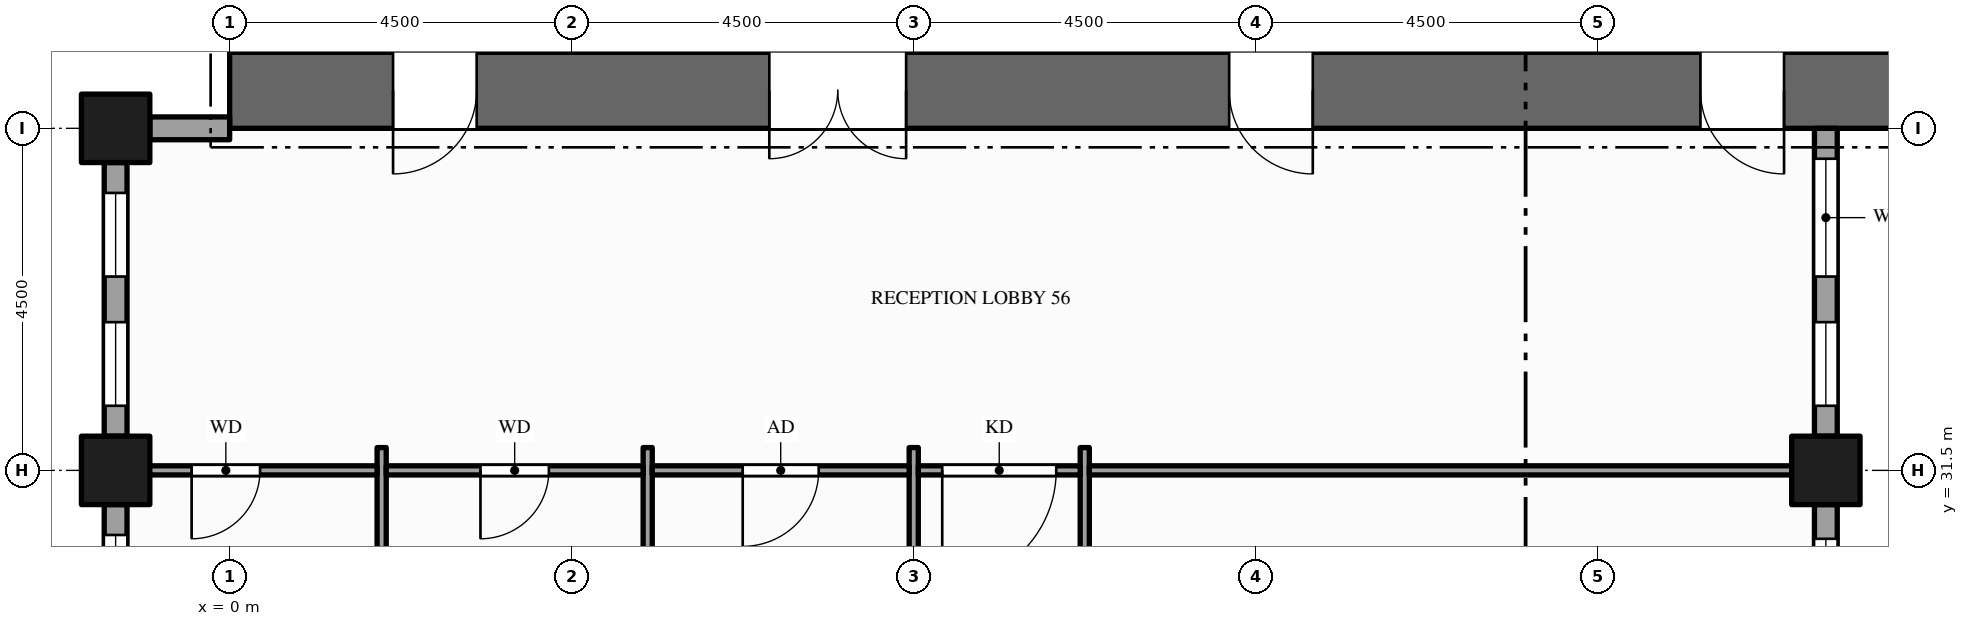
"""IFC4 building model, lengths in metres.
Left out: names, types, materials, properties, quantities, classifications, styles, units other than length and angle.
Written with IfcOpenShell. Run it as: python <this file> out.ifc"""

import sys

from ifc_helpers import new_model, si_unit, direction, frame, frame_2d, origin, origin_2d, place, context, subcontext, project, spatial, rectangle, hollow_rectangle, extrude, element, fill, save


model = new_model("IFC4")
c1 = context("Model", 3, precision=1e-05, world=origin(), true_north=direction((0.0, 1.0)))
c2 = subcontext(c1, "Body", "Model", "MODEL_VIEW")
j1 = project(units=[si_unit("LENGTHUNIT", "METRE"), si_unit("PLANEANGLEUNIT", "RADIAN")], contexts=[c1])
p1 = place(None, origin())
s1 = spatial("IfcSite", under=j1, at=p1, CompositionType="ELEMENT")
p2 = place(p1, origin())
s2 = spatial("IfcBuilding", under=s1, at=p2, CompositionType="ELEMENT")
p3 = place(p2, frame((0.0, 0.0, 155.0)))
s3 = spatial("IfcBuildingStorey", under=s2, at=p3, CompositionType="ELEMENT", Elevation=155.0)
p4 = place(p3, frame((0.0, 36.5, -0.15), z_axis=(0.0, 0.0, 1.0), x_axis=(1.0, 0.0, 0.0)))
e1 = element("IfcWall", 1, at=p4, inside=s3, PredefinedType="SHEAR", context=c2, shape_type="SweptSolid", body=[
    extrude(rectangle(XDim=22.5, YDim=1.0, at=frame_2d((11.25, 0.0))), origin(), (0.0, 0.0, 1.0), 4.0),
])
p5 = place(p4, frame((7.1, 0.0, 0.15)))
e2 = element("IfcOpeningElement", 2, at=p5, cuts=e1, PredefinedType="OPENING", context=c2, shape_type="SweptSolid", body=[
    extrude(rectangle(XDim=1.8, YDim=2.1, at=frame_2d((0.9, 1.05))), frame((0.0, 0.51, 0.0), z_axis=(0.0, -1.0, 0.0), x_axis=(1.0, 0.0, 0.0)), (0.0, 0.0, 1.0), 1.02),
])
p6 = place(p4, frame((13.15, 0.0, 0.15)))
e3 = element("IfcOpeningElement", 3, at=p6, cuts=e1, PredefinedType="OPENING", context=c2, shape_type="SweptSolid", body=[
    extrude(rectangle(XDim=1.1, YDim=2.1, at=frame_2d((0.55, 1.05))), frame((0.0, 0.51, 0.0), z_axis=(0.0, -1.0, 0.0), x_axis=(1.0, 0.0, 0.0)), (0.0, 0.0, 1.0), 1.02),
])
p7 = place(p4, frame((2.15, 0.0, 0.15)))
e4 = element("IfcOpeningElement", 4, at=p7, cuts=e1, PredefinedType="OPENING", context=c2, shape_type="SweptSolid", body=[
    extrude(rectangle(XDim=1.1, YDim=2.1, at=frame_2d((0.55, 1.05))), frame((0.0, 0.51, 0.0), z_axis=(0.0, -1.0, 0.0), x_axis=(1.0, 0.0, 0.0)), (0.0, 0.0, 1.0), 1.02),
])
p8 = place(p4, frame((19.35, 0.0, 0.15)))
e5 = element("IfcOpeningElement", 5, at=p8, cuts=e1, PredefinedType="OPENING", context=c2, shape_type="SweptSolid", body=[
    extrude(rectangle(XDim=1.1, YDim=2.1, at=frame_2d((0.55, 1.05))), frame((0.0, 0.51, 0.0), z_axis=(0.0, -1.0, 0.0), x_axis=(1.0, 0.0, 0.0)), (0.0, 0.0, 1.0), 1.02),
])
for number, where, z_axis, x_axis in (
    (6, (-1.5, 31.5, -0.15), (0.0, 0.0, 1.0), (1.0, 0.0, 0.0)),
    (7, (-1.5, 36.0, -0.15), (0.0, 0.0, 1.0), (1.0, 0.0, 0.0)),
    (8, (21.0, 31.5, -0.15), (0.0, 0.0, 1.0), (1.0, 0.0, 0.0)),
):
    element("IfcColumn", number, at=place(p3, frame(where, z_axis=z_axis, x_axis=x_axis)), inside=s3, PredefinedType="COLUMN", context=c2, shape_type="SweptSolid", body=[
        extrude(hollow_rectangle(XDim=0.9, YDim=0.9, WallThickness=0.045, at=origin_2d()), origin(), (0.0, 0.0, 1.0), 4.0),
    ])
p9 = place(p3, frame((21.0, 28.95, 0.0), z_axis=(0.0, 0.0, 1.0), x_axis=(0.0, 1.0, 0.0)))
e9 = element("IfcWall", 9, at=p9, inside=s3, PredefinedType="STANDARD", context=c2, shape_type="SweptSolid", body=[
    extrude(rectangle(XDim=2.1, YDim=0.3, at=frame_2d((1.05, 0.0))), origin(), (0.0, 0.0, 1.0), 3.149),
])
p10 = place(p9, frame((0.45, 0.0, 0.9)))
e10 = element("IfcOpeningElement", 10, at=p10, cuts=e9, PredefinedType="OPENING", context=c2, shape_type="SweptSolid", body=[
    extrude(rectangle(XDim=1.2, YDim=2.0, at=frame_2d((0.6, 1.0))), frame((0.0, 0.16, 0.0), z_axis=(0.0, -1.0, 0.0), x_axis=(1.0, 0.0, 0.0)), (0.0, 0.0, 1.0), 0.32),
])
p11 = place(p3, frame((21.0, 31.95, 0.0), z_axis=(0.0, 0.0, 1.0), x_axis=(0.0, 1.0, 0.0)))
e11 = element("IfcWall", 11, at=p11, inside=s3, PredefinedType="STANDARD", context=c2, shape_type="SweptSolid", body=[
    extrude(rectangle(XDim=4.05, YDim=0.3, at=frame_2d((2.025, 0.0))), origin(), (0.0, 0.0, 1.0), 3.149),
])
p12 = place(p11, frame((0.4, 0.0, 0.9)))
e12 = element("IfcOpeningElement", 12, at=p12, cuts=e11, PredefinedType="OPENING", context=c2, shape_type="SweptSolid", body=[
    extrude(rectangle(XDim=1.1, YDim=2.0, at=frame_2d((0.55, 1.0))), frame((0.0, 0.16, 0.0), z_axis=(0.0, -1.0, 0.0), x_axis=(1.0, 0.0, 0.0)), (0.0, 0.0, 1.0), 0.32),
])
p13 = place(p11, frame((2.1, 0.0, 0.9)))
e13 = element("IfcOpeningElement", 13, at=p13, cuts=e11, PredefinedType="OPENING", context=c2, shape_type="SweptSolid", body=[
    extrude(rectangle(XDim=1.55, YDim=2.0, at=frame_2d((0.775, 1.0))), frame((0.0, 0.16, 0.0), z_axis=(0.0, -1.0, 0.0), x_axis=(1.0, 0.0, 0.0)), (0.0, 0.0, 1.0), 0.32),
])
p14 = place(p3, frame((0.0, 36.0, 0.0), z_axis=(0.0, 0.0, 1.0), x_axis=(-1.0, 0.0, 0.0)))
e14 = element("IfcWall", 14, at=p14, inside=s3, PredefinedType="STANDARD", context=c2, shape_type="SweptSolid", body=[
    extrude(rectangle(XDim=1.05, YDim=0.3, at=frame_2d((0.525, 0.0))), origin(), (0.0, 0.0, 1.0), 2.87),
])
p15 = place(p3, frame((-1.5, 35.55, 0.0), z_axis=(0.0, 0.0, 1.0), x_axis=(0.0, -1.0, 0.0)))
e15 = element("IfcWall", 15, at=p15, inside=s3, PredefinedType="STANDARD", context=c2, shape_type="SweptSolid", body=[
    extrude(rectangle(XDim=3.6, YDim=0.3, at=frame_2d((1.8, 0.0))), origin(), (0.0, 0.0, 1.0), 3.149),
])
p16 = place(p15, frame((0.4, 0.0, 0.9)))
e16 = element("IfcOpeningElement", 16, at=p16, cuts=e15, PredefinedType="OPENING", context=c2, shape_type="SweptSolid", body=[
    extrude(rectangle(XDim=1.1, YDim=2.0, at=frame_2d((0.55, 1.0))), frame((0.0, 0.16, 0.0), z_axis=(0.0, -1.0, 0.0), x_axis=(1.0, 0.0, 0.0)), (0.0, 0.0, 1.0), 0.32),
])
p17 = place(p15, frame((2.1, 0.0, 0.9)))
e17 = element("IfcOpeningElement", 17, at=p17, cuts=e15, PredefinedType="OPENING", context=c2, shape_type="SweptSolid", body=[
    extrude(rectangle(XDim=1.1, YDim=2.0, at=frame_2d((0.55, 1.0))), frame((0.0, 0.16, 0.0), z_axis=(0.0, -1.0, 0.0), x_axis=(1.0, 0.0, 0.0)), (0.0, 0.0, 1.0), 0.32),
])
p18 = place(p3, frame((-1.5, 31.05, 0.0), z_axis=(0.0, 0.0, 1.0), x_axis=(0.0, -1.0, 0.0)))
e18 = element("IfcWall", 18, at=p18, inside=s3, PredefinedType="STANDARD", context=c2, shape_type="SweptSolid", body=[
    extrude(rectangle(XDim=3.6, YDim=0.3, at=frame_2d((1.8, 0.0))), origin(), (0.0, 0.0, 1.0), 3.149),
])
p19 = place(p18, frame((0.4, 0.0, 0.9)))
e19 = element("IfcOpeningElement", 19, at=p19, cuts=e18, PredefinedType="OPENING", context=c2, shape_type="SweptSolid", body=[
    extrude(rectangle(XDim=1.1, YDim=2.0, at=frame_2d((0.55, 1.0))), frame((0.0, 0.16, 0.0), z_axis=(0.0, -1.0, 0.0), x_axis=(1.0, 0.0, 0.0)), (0.0, 0.0, 1.0), 0.32),
])
p20 = place(p18, frame((2.1, 0.0, 0.9)))
e20 = element("IfcOpeningElement", 20, at=p20, cuts=e18, PredefinedType="OPENING", context=c2, shape_type="SweptSolid", body=[
    extrude(rectangle(XDim=1.1, YDim=2.0, at=frame_2d((0.55, 1.0))), frame((0.0, 0.16, 0.0), z_axis=(0.0, -1.0, 0.0), x_axis=(1.0, 0.0, 0.0)), (0.0, 0.0, 1.0), 0.32),
])
for number, where, z_axis, x_axis in (
    (21, (2.0, 26.7, 0.0), (0.0, 0.0, 1.0), (0.0, 1.0, 0.0)),
    (22, (5.5, 26.7, 0.0), (0.0, 0.0, 1.0), (0.0, 1.0, 0.0)),
):
    element("IfcWall", number, at=place(p3, frame(where, z_axis=z_axis, x_axis=x_axis)), inside=s3, PredefinedType="PARTITIONING", context=c2, shape_type="SweptSolid", body=[
        extrude(rectangle(XDim=5.1, YDim=0.12, at=frame_2d((2.55, 0.0))), origin(), (0.0, 0.0, 1.0), 3.85),
    ])
p21 = place(p3, frame((9.0, 13.2, 0.0), z_axis=(0.0, 0.0, 1.0), x_axis=(0.0, 1.0, 0.0)))
e23 = element("IfcWall", 23, at=p21, inside=s3, PredefinedType="PARTITIONING", context=c2, shape_type="SweptSolid", body=[
    extrude(rectangle(XDim=18.6, YDim=0.12, at=frame_2d((9.3, 0.0))), origin(), (0.0, 0.0, 1.0), 2.6),
])
p22 = place(p21, frame((3.175, 0.0, 0.0)))
e24 = element("IfcOpeningElement", 24, at=p22, cuts=e23, PredefinedType="OPENING", context=c2, shape_type="SweptSolid", body=[
    extrude(rectangle(XDim=1.0, YDim=2.1, at=frame_2d((0.5, 1.05))), frame((0.0, 0.07, 0.0), z_axis=(0.0, -1.0, 0.0), x_axis=(1.0, 0.0, 0.0)), (0.0, 0.0, 1.0), 0.14),
])
p23 = place(p21, frame((9.955, 0.0, 0.0)))
e25 = element("IfcOpeningElement", 25, at=p23, cuts=e23, PredefinedType="OPENING", context=c2, shape_type="SweptSolid", body=[
    extrude(rectangle(XDim=1.0, YDim=2.1, at=frame_2d((0.5, 1.05))), frame((0.0, 0.07, 0.0), z_axis=(0.0, -1.0, 0.0), x_axis=(1.0, 0.0, 0.0)), (0.0, 0.0, 1.0), 0.14),
])
p24 = place(p3, frame((11.25, 13.2, 0.0), z_axis=(0.0, 0.0, 1.0), x_axis=(0.0, 1.0, 0.0)))
e26 = element("IfcWall", 26, at=p24, inside=s3, PredefinedType="PARTITIONING", context=c2, shape_type="SweptSolid", body=[
    extrude(rectangle(XDim=18.6, YDim=0.12, at=frame_2d((9.3, 0.0))), origin(), (0.0, 0.0, 1.0), 2.6),
])
p25 = place(p24, frame((4.2, 0.0, 0.0)))
e27 = element("IfcOpeningElement", 27, at=p25, cuts=e26, PredefinedType="OPENING", context=c2, shape_type="SweptSolid", body=[
    extrude(rectangle(XDim=1.2, YDim=2.1, at=frame_2d((0.6, 1.05))), frame((0.0, 0.07, 0.0), z_axis=(0.0, -1.0, 0.0), x_axis=(1.0, 0.0, 0.0)), (0.0, 0.0, 1.0), 0.14),
])
p26 = place(p3, frame((-1.35, 31.5, 0.0), z_axis=(0.0, 0.0, 1.0), x_axis=(1.0, 0.0, 0.0)))
e28 = element("IfcWall", 28, at=p26, inside=s3, PredefinedType="PARTITIONING", context=c2, shape_type="SweptSolid", body=[
    extrude(rectangle(XDim=3.29, YDim=0.12, at=frame_2d((1.645, 0.0))), origin(), (0.0, 0.0, 1.0), 2.87),
])
p27 = place(p26, frame((0.85, 0.0, 0.0)))
e29 = element("IfcOpeningElement", 29, at=p27, cuts=e28, PredefinedType="OPENING", context=c2, shape_type="SweptSolid", body=[
    extrude(rectangle(XDim=0.9, YDim=2.1, at=frame_2d((0.45, 1.05))), frame((0.0, 0.07, 0.0), z_axis=(0.0, -1.0, 0.0), x_axis=(1.0, 0.0, 0.0)), (0.0, 0.0, 1.0), 0.14),
])
p28 = place(p3, frame((2.06, 31.5, 0.0), z_axis=(0.0, 0.0, 1.0), x_axis=(1.0, 0.0, 0.0)))
e30 = element("IfcWall", 30, at=p28, inside=s3, PredefinedType="PARTITIONING", context=c2, shape_type="SweptSolid", body=[
    extrude(rectangle(XDim=3.38, YDim=0.12, at=frame_2d((1.69, 0.0))), origin(), (0.0, 0.0, 1.0), 2.87),
])
p29 = place(p28, frame((1.24, 0.0, 0.0)))
e31 = element("IfcOpeningElement", 31, at=p29, cuts=e30, PredefinedType="OPENING", context=c2, shape_type="SweptSolid", body=[
    extrude(rectangle(XDim=0.9, YDim=2.1, at=frame_2d((0.45, 1.05))), frame((0.0, 0.07, 0.0), z_axis=(0.0, -1.0, 0.0), x_axis=(1.0, 0.0, 0.0)), (0.0, 0.0, 1.0), 0.14),
])
p30 = place(p3, frame((5.56, 31.5, 0.0), z_axis=(0.0, 0.0, 1.0), x_axis=(1.0, 0.0, 0.0)))
e32 = element("IfcWall", 32, at=p30, inside=s3, PredefinedType="PARTITIONING", context=c2, shape_type="SweptSolid", body=[
    extrude(rectangle(XDim=3.38, YDim=0.12, at=frame_2d((1.69, 0.0))), origin(), (0.0, 0.0, 1.0), 2.87),
])
p31 = place(p30, frame((1.19, 0.0, 0.0)))
e33 = element("IfcOpeningElement", 33, at=p31, cuts=e32, PredefinedType="OPENING", context=c2, shape_type="SweptSolid", body=[
    extrude(rectangle(XDim=1.0, YDim=2.1, at=frame_2d((0.5, 1.05))), frame((0.0, 0.07, 0.0), z_axis=(0.0, -1.0, 0.0), x_axis=(1.0, 0.0, 0.0)), (0.0, 0.0, 1.0), 0.14),
])
p32 = place(p3, frame((9.06, 31.5, 0.0), z_axis=(0.0, 0.0, 1.0), x_axis=(1.0, 0.0, 0.0)))
e34 = element("IfcWall", 34, at=p32, inside=s3, PredefinedType="PARTITIONING", context=c2, shape_type="SweptSolid", body=[
    extrude(rectangle(XDim=2.13, YDim=0.12, at=frame_2d((1.065, 0.0))), origin(), (0.0, 0.0, 1.0), 2.87),
])
p33 = place(p32, frame((0.315, 0.0, 0.0)))
e35 = element("IfcOpeningElement", 35, at=p33, cuts=e34, PredefinedType="OPENING", context=c2, shape_type="SweptSolid", body=[
    extrude(rectangle(XDim=1.5, YDim=2.1, at=frame_2d((0.75, 1.05))), frame((0.0, 0.07, 0.0), z_axis=(0.0, -1.0, 0.0), x_axis=(1.0, 0.0, 0.0)), (0.0, 0.0, 1.0), 0.14),
])
p34 = place(p3, frame((11.31, 31.5, 0.0), z_axis=(0.0, 0.0, 1.0), x_axis=(1.0, 0.0, 0.0)))
e36 = element("IfcWall", 36, at=p34, inside=s3, PredefinedType="PARTITIONING", context=c2, shape_type="SweptSolid", body=[
    extrude(rectangle(XDim=9.54, YDim=0.12, at=frame_2d((4.77, 0.0))), origin(), (0.0, 0.0, 1.0), 2.87),
])
p35 = place(p10, origin())
e37 = element("IfcWindow", 37, at=p35, inside=s3, PartitioningType="SINGLE_PANEL", PredefinedType="WINDOW", context=c2, shape_type="SweptSolid", body=[
    extrude(rectangle(XDim=1.2, YDim=2.0, at=frame_2d((0.6, 1.0))), frame((0.0, 0.03, 0.0), z_axis=(0.0, -1.0, 0.0), x_axis=(1.0, 0.0, 0.0)), (0.0, 0.0, 1.0), 0.06),
])
fill(e10, e37)
p36 = place(p12, origin())
e38 = element("IfcWindow", 38, at=p36, inside=s3, PartitioningType="SINGLE_PANEL", PredefinedType="WINDOW", context=c2, shape_type="SweptSolid", body=[
    extrude(rectangle(XDim=1.1, YDim=2.0, at=frame_2d((0.55, 1.0))), frame((0.0, 0.03, 0.0), z_axis=(0.0, -1.0, 0.0), x_axis=(1.0, 0.0, 0.0)), (0.0, 0.0, 1.0), 0.06),
])
fill(e12, e38)
p37 = place(p13, origin())
e39 = element("IfcWindow", 39, at=p37, inside=s3, PartitioningType="SINGLE_PANEL", PredefinedType="WINDOW", context=c2, shape_type="SweptSolid", body=[
    extrude(rectangle(XDim=1.55, YDim=2.0, at=frame_2d((0.775, 1.0))), frame((0.0, 0.03, 0.0), z_axis=(0.0, -1.0, 0.0), x_axis=(1.0, 0.0, 0.0)), (0.0, 0.0, 1.0), 0.06),
])
fill(e13, e39)
p38 = place(p16, origin())
e40 = element("IfcWindow", 40, at=p38, inside=s3, PartitioningType="SINGLE_PANEL", PredefinedType="WINDOW", context=c2, shape_type="SweptSolid", body=[
    extrude(rectangle(XDim=1.1, YDim=2.0, at=frame_2d((0.55, 1.0))), frame((0.0, 0.03, 0.0), z_axis=(0.0, -1.0, 0.0), x_axis=(1.0, 0.0, 0.0)), (0.0, 0.0, 1.0), 0.06),
])
fill(e16, e40)
p39 = place(p17, origin())
e41 = element("IfcWindow", 41, at=p39, inside=s3, PartitioningType="SINGLE_PANEL", PredefinedType="WINDOW", context=c2, shape_type="SweptSolid", body=[
    extrude(rectangle(XDim=1.1, YDim=2.0, at=frame_2d((0.55, 1.0))), frame((0.0, 0.03, 0.0), z_axis=(0.0, -1.0, 0.0), x_axis=(1.0, 0.0, 0.0)), (0.0, 0.0, 1.0), 0.06),
])
fill(e17, e41)
p40 = place(p19, origin())
e42 = element("IfcWindow", 42, at=p40, inside=s3, PartitioningType="SINGLE_PANEL", PredefinedType="WINDOW", context=c2, shape_type="SweptSolid", body=[
    extrude(rectangle(XDim=1.1, YDim=2.0, at=frame_2d((0.55, 1.0))), frame((0.0, 0.03, 0.0), z_axis=(0.0, -1.0, 0.0), x_axis=(1.0, 0.0, 0.0)), (0.0, 0.0, 1.0), 0.06),
])
fill(e19, e42)
p41 = place(p5, origin())
e43 = element("IfcDoor", 43, at=p41, inside=s3, OperationType="DOUBLE_DOOR_SINGLE_SWING", PredefinedType="DOOR", context=c2, shape_type="SweptSolid", body=[
    extrude(rectangle(XDim=1.8, YDim=2.1, at=frame_2d((0.9, 1.05))), frame((0.0, 0.025, 0.0), z_axis=(0.0, -1.0, 0.0), x_axis=(1.0, 0.0, 0.0)), (0.0, 0.0, 1.0), 0.05),
])
fill(e2, e43)
p42 = place(p6, origin())
e44 = element("IfcDoor", 44, at=p42, inside=s3, OperationType="SINGLE_SWING_RIGHT", PredefinedType="DOOR", context=c2, shape_type="SweptSolid", body=[
    extrude(rectangle(XDim=1.1, YDim=2.1, at=frame_2d((0.55, 1.05))), frame((0.0, 0.025, 0.0), z_axis=(0.0, -1.0, 0.0), x_axis=(1.0, 0.0, 0.0)), (0.0, 0.0, 1.0), 0.05),
])
fill(e3, e44)
p43 = place(p7, origin())
e45 = element("IfcDoor", 45, at=p43, inside=s3, OperationType="SINGLE_SWING_LEFT", PredefinedType="DOOR", context=c2, shape_type="SweptSolid", body=[
    extrude(rectangle(XDim=1.1, YDim=2.1, at=frame_2d((0.55, 1.05))), frame((0.0, 0.025, 0.0), z_axis=(0.0, -1.0, 0.0), x_axis=(1.0, 0.0, 0.0)), (0.0, 0.0, 1.0), 0.05),
])
fill(e4, e45)
p44 = place(p8, origin())
e46 = element("IfcDoor", 46, at=p44, inside=s3, OperationType="SINGLE_SWING_RIGHT", PredefinedType="DOOR", context=c2, shape_type="SweptSolid", body=[
    extrude(rectangle(XDim=1.1, YDim=2.1, at=frame_2d((0.55, 1.05))), frame((0.0, 0.025, 0.0), z_axis=(0.0, -1.0, 0.0), x_axis=(1.0, 0.0, 0.0)), (0.0, 0.0, 1.0), 0.05),
])
fill(e5, e46)
p45 = place(p33, origin())
e47 = element("IfcDoor", 47, at=p45, inside=s3, OperationType="SINGLE_SWING_LEFT", PredefinedType="DOOR", context=c2, shape_type="SweptSolid", body=[
    extrude(rectangle(XDim=1.5, YDim=2.1, at=frame_2d((0.75, 1.05))), frame((0.0, 0.025, 0.0), z_axis=(0.0, -1.0, 0.0), x_axis=(1.0, 0.0, 0.0)), (0.0, 0.0, 1.0), 0.05),
])
fill(e35, e47)
p46 = place(p27, origin())
e48 = element("IfcDoor", 48, at=p46, inside=s3, OperationType="SINGLE_SWING_LEFT", PredefinedType="DOOR", context=c2, shape_type="SweptSolid", body=[
    extrude(rectangle(XDim=0.9, YDim=2.1, at=frame_2d((0.45, 1.05))), frame((0.0, 0.025, 0.0), z_axis=(0.0, -1.0, 0.0), x_axis=(1.0, 0.0, 0.0)), (0.0, 0.0, 1.0), 0.05),
])
fill(e29, e48)
p47 = place(p29, origin())
e49 = element("IfcDoor", 49, at=p47, inside=s3, OperationType="SINGLE_SWING_LEFT", PredefinedType="DOOR", context=c2, shape_type="SweptSolid", body=[
    extrude(rectangle(XDim=0.9, YDim=2.1, at=frame_2d((0.45, 1.05))), frame((0.0, 0.025, 0.0), z_axis=(0.0, -1.0, 0.0), x_axis=(1.0, 0.0, 0.0)), (0.0, 0.0, 1.0), 0.05),
])
fill(e31, e49)
p48 = place(p31, origin())
e50 = element("IfcDoor", 50, at=p48, inside=s3, OperationType="SINGLE_SWING_LEFT", PredefinedType="DOOR", context=c2, shape_type="SweptSolid", body=[
    extrude(rectangle(XDim=1.0, YDim=2.1, at=frame_2d((0.5, 1.05))), frame((0.0, 0.025, 0.0), z_axis=(0.0, -1.0, 0.0), x_axis=(1.0, 0.0, 0.0)), (0.0, 0.0, 1.0), 0.05),
])
fill(e33, e50)
save(model, sys.argv[1])
